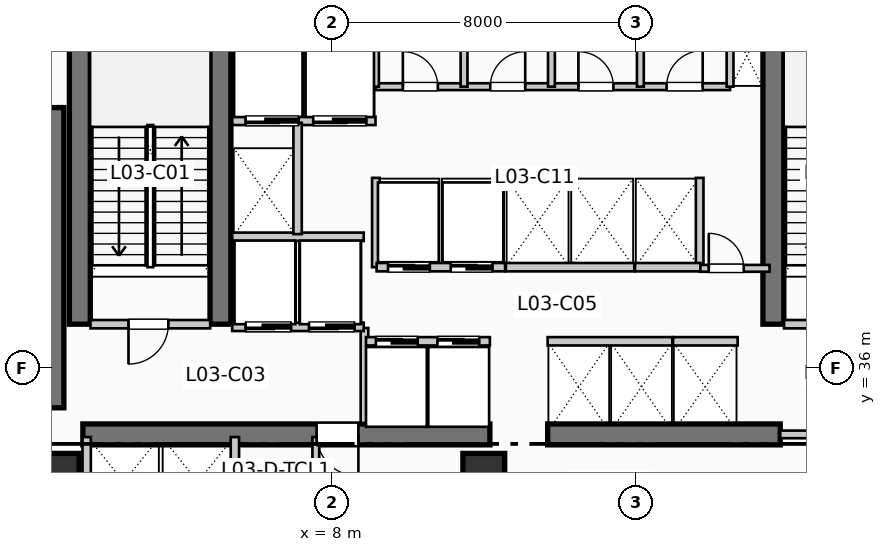
"""IFC4 building model, lengths in metres.
Left out: names, types, materials, properties, quantities, classifications, styles, units other than length and angle.
Written with IfcOpenShell. Run it as: python <this file> out.ifc"""

import sys

from ifc_helpers import new_model, si_unit, direction, frame, frame_2d, origin, origin_2d, place, context, subcontext, project, spatial, rectangle, extrude, element, fill, save


model = new_model("IFC4")
c1 = context("Model", 3, precision=1e-05, world=origin(), true_north=direction((0.0, 1.0)))
c2 = subcontext(c1, "Body", "Model", "MODEL_VIEW")
j1 = project(units=[si_unit("LENGTHUNIT", "METRE"), si_unit("PLANEANGLEUNIT", "RADIAN")], contexts=[c1])
p1 = place(None, origin())
s1 = spatial("IfcSite", under=j1, at=p1, CompositionType="ELEMENT")
p2 = place(p1, origin())
s2 = spatial("IfcBuilding", under=s1, at=p2, CompositionType="ELEMENT")
p3 = place(p2, frame((0.0, 0.0, 16.5)))
s3 = spatial("IfcBuildingStorey", under=s2, at=p3, CompositionType="ELEMENT", Elevation=16.5)
p4 = place(p3, frame((0.5, 34.95, 0.0), z_axis=(0.0, 0.0, 1.0), x_axis=(0.0, 1.0, 0.0)))
e1 = element("IfcWall", 1, at=p4, inside=s3, PredefinedType="SHEAR", context=c2, shape_type="SweptSolid", body=[
    extrude(rectangle(XDim=7.9, YDim=0.9, at=frame_2d((3.95, 0.0))), origin(), (0.0, 0.0, 1.0), 4.62),
])
p5 = place(p3, frame((1.45, 34.25, 0.0), z_axis=(0.0, 0.0, 1.0), x_axis=(1.0, 0.0, 0.0)))
e2 = element("IfcWall", 2, at=p5, inside=s3, PredefinedType="SHEAR", context=c2, shape_type="SweptSolid", body=[
    extrude(rectangle(XDim=10.71, YDim=0.55, at=frame_2d((5.355, 0.0))), origin(), (0.0, 0.0, 1.0), 4.62),
])
p6 = place(p5, frame((7.25, 0.0, 0.0), z_axis=(0.0, 0.0, 1.0), x_axis=(-1.0, 0.0, 0.0)))
e3 = element("IfcOpeningElement", 3, at=p6, cuts=e2, PredefinedType="OPENING", context=c2, shape_type="SweptSolid", body=[
    extrude(rectangle(XDim=1.1, YDim=2.15, at=frame_2d((0.55, 1.075))), frame((0.0, 0.285, 0.0), z_axis=(0.0, -1.0, 0.0), x_axis=(1.0, 0.0, 0.0)), (0.0, 0.0, 1.0), 0.57),
])
p7 = place(p3, frame((13.68, 34.25, 0.0), z_axis=(0.0, 0.0, 1.0), x_axis=(1.0, 0.0, 0.0)))
e4 = element("IfcWall", 4, at=p7, inside=s3, PredefinedType="SHEAR", context=c2, shape_type="SweptSolid", body=[
    extrude(rectangle(XDim=6.12, YDim=0.55, at=frame_2d((3.06, 0.0))), origin(), (0.0, 0.0, 1.0), 4.62),
])
for number, where, z_axis, x_axis in (
    (5, (1.37, 37.15, 0.0), (0.0, 0.0, 1.0), (0.0, 1.0, 0.0)),
    (6, (5.07, 37.15, 0.0), (0.0, 0.0, 1.0), (0.0, 1.0, 0.0)),
    (7, (19.62, 37.15, 0.0), (0.0, 0.0, 1.0), (0.0, 1.0, 0.0)),
):
    element("IfcWall", number, at=place(p3, frame(where, z_axis=z_axis, x_axis=x_axis)), inside=s3, PredefinedType="SHEAR", context=c2, shape_type="SweptSolid", body=[
        extrude(rectangle(XDim=7.89, YDim=0.55, at=frame_2d((3.945, 0.0))), origin(), (0.0, 0.0, 1.0), 4.62),
    ])
for number, where, z_axis, x_axis in (
    (8, (0.8, 33.2, 0.0), (0.0, 0.0, 1.0), (1.0, 0.0, 0.0)),
    (9, (12.0, 33.2, 0.0), (0.0, 0.0, 1.0), (1.0, 0.0, 0.0)),
):
    element("IfcColumn", number, at=place(p3, frame(where, z_axis=z_axis, x_axis=x_axis)), inside=s3, PredefinedType="COLUMN", context=c2, shape_type="SweptSolid", body=[
        extrude(rectangle(XDim=1.1, YDim=1.1, at=origin_2d()), origin(), (0.0, 0.0, 1.0), 4.62),
    ])
p8 = place(p3, frame((1.65, 37.15, 0.0), z_axis=(0.0, 0.0, 1.0), x_axis=(1.0, 0.0, 0.0)))
e10 = element("IfcWall", 10, at=p8, inside=s3, PredefinedType="PARTITIONING", context=c2, shape_type="SweptSolid", body=[
    extrude(rectangle(XDim=3.15, YDim=0.22, at=frame_2d((1.575, 0.0))), origin(), (0.0, 0.0, 1.0), 4.3),
])
p9 = place(p8, frame((2.05, 0.0, 0.0), z_axis=(0.0, 0.0, 1.0), x_axis=(-1.0, 0.0, 0.0)))
e11 = element("IfcOpeningElement", 11, at=p9, cuts=e10, PredefinedType="OPENING", context=c2, shape_type="SweptSolid", body=[
    extrude(rectangle(XDim=1.05, YDim=2.15, at=frame_2d((0.525, 1.075))), frame((0.0, 0.12, 0.0), z_axis=(0.0, -1.0, 0.0), x_axis=(1.0, 0.0, 0.0)), (0.0, 0.0, 1.0), 0.24),
])
p10 = place(p3, frame((8.86, 34.55, 0.0), z_axis=(0.0, 0.0, 1.0), x_axis=(0.0, 1.0, 0.0)))
e12 = element("IfcWall", 12, at=p10, inside=s3, PredefinedType="PARTITIONING", context=c2, shape_type="SweptSolid", body=[
    extrude(rectangle(XDim=2.5, YDim=0.2, at=frame_2d((1.25, 0.0))), origin(), (0.0, 0.0, 1.0), 4.3),
])
p11 = place(p3, frame((19.9, 37.15, 0.0), z_axis=(0.0, 0.0, 1.0), x_axis=(1.0, 0.0, 0.0)))
e13 = element("IfcWall", 13, at=p11, inside=s3, PredefinedType="PARTITIONING", context=c2, shape_type="SweptSolid", body=[
    extrude(rectangle(XDim=3.15, YDim=0.22, at=frame_2d((1.575, 0.0))), origin(), (0.0, 0.0, 1.0), 4.3),
])
p12 = place(p11, frame((2.05, 0.0, 0.0), z_axis=(0.0, 0.0, 1.0), x_axis=(-1.0, 0.0, 0.0)))
e14 = element("IfcOpeningElement", 14, at=p12, cuts=e13, PredefinedType="OPENING", context=c2, shape_type="SweptSolid", body=[
    extrude(rectangle(XDim=1.05, YDim=2.15, at=frame_2d((0.525, 1.075))), frame((0.0, 0.12, 0.0), z_axis=(0.0, -1.0, 0.0), x_axis=(1.0, 0.0, 0.0)), (0.0, 0.0, 1.0), 0.24),
])
p13 = place(p3, frame((19.8, 34.25, 0.0), z_axis=(0.0, 0.0, 1.0), x_axis=(1.0, 0.0, 0.0)))
e15 = element("IfcWall", 15, at=p13, inside=s3, PredefinedType="PARTITIONING", context=c2, shape_type="SweptSolid", body=[
    extrude(rectangle(XDim=3.25, YDim=0.2, at=frame_2d((1.625, 0.0))), origin(), (0.0, 0.0, 1.0), 4.3),
])
p14 = place(p13, frame((2.15, 0.0, 0.0), z_axis=(0.0, 0.0, 1.0), x_axis=(-1.0, 0.0, 0.0)))
e16 = element("IfcOpeningElement", 16, at=p14, cuts=e15, PredefinedType="OPENING", context=c2, shape_type="SweptSolid", body=[
    extrude(rectangle(XDim=1.1, YDim=2.15, at=frame_2d((0.55, 1.075))), frame((0.0, 0.11, 0.0), z_axis=(0.0, -1.0, 0.0), x_axis=(1.0, 0.0, 0.0)), (0.0, 0.0, 1.0), 0.22),
])
p15 = place(p3, frame((5.38, 37.08, 0.0), z_axis=(0.0, 0.0, 1.0), x_axis=(1.0, 0.0, 0.0)))
e17 = element("IfcWall", 17, at=p15, inside=s3, PredefinedType="PARTITIONING", context=c2, shape_type="SweptSolid", body=[
    extrude(rectangle(XDim=3.46, YDim=0.22, at=frame_2d((1.73, 0.0))), origin(), (0.0, 0.0, 1.0), 4.3),
])
p16 = place(p15, frame((1.55, 0.0, 0.0), z_axis=(0.0, 0.0, 1.0), x_axis=(-1.0, 0.0, 0.0)))
e18 = element("IfcOpeningElement", 18, at=p16, cuts=e17, PredefinedType="OPENING", context=c2, shape_type="SweptSolid", body=[
    extrude(rectangle(XDim=1.2, YDim=2.2, at=frame_2d((0.6, 1.1))), frame((0.0, 0.12, 0.0), z_axis=(0.0, -1.0, 0.0), x_axis=(1.0, 0.0, 0.0)), (0.0, 0.0, 1.0), 0.24),
])
p17 = place(p15, frame((3.22, 0.0, 0.0), z_axis=(0.0, 0.0, 1.0), x_axis=(-1.0, 0.0, 0.0)))
e19 = element("IfcOpeningElement", 19, at=p17, cuts=e17, PredefinedType="OPENING", context=c2, shape_type="SweptSolid", body=[
    extrude(rectangle(XDim=1.2, YDim=2.2, at=frame_2d((0.6, 1.1))), frame((0.0, 0.12, 0.0), z_axis=(0.0, -1.0, 0.0), x_axis=(1.0, 0.0, 0.0)), (0.0, 0.0, 1.0), 0.24),
])
p18 = place(p3, frame((5.38, 39.45, 0.0), z_axis=(0.0, 0.0, 1.0), x_axis=(1.0, 0.0, 0.0)))
e20 = element("IfcWall", 20, at=p18, inside=s3, PredefinedType="PARTITIONING", context=c2, shape_type="SweptSolid", body=[
    extrude(rectangle(XDim=3.46, YDim=0.22, at=frame_2d((1.73, 0.0))), origin(), (0.0, 0.0, 1.0), 4.3),
])
p19 = place(p3, frame((5.38, 42.5, 0.0), z_axis=(0.0, 0.0, 1.0), x_axis=(1.0, 0.0, 0.0)))
e21 = element("IfcWall", 21, at=p19, inside=s3, PredefinedType="PARTITIONING", context=c2, shape_type="SweptSolid", body=[
    extrude(rectangle(XDim=3.77, YDim=0.22, at=frame_2d((1.885, 0.0))), origin(), (0.0, 0.0, 1.0), 4.3),
])
p20 = place(p19, frame((1.75, 0.0, 0.0), z_axis=(0.0, 0.0, 1.0), x_axis=(-1.0, 0.0, 0.0)))
e22 = element("IfcOpeningElement", 22, at=p20, cuts=e21, PredefinedType="OPENING", context=c2, shape_type="SweptSolid", body=[
    extrude(rectangle(XDim=1.4, YDim=2.2, at=frame_2d((0.7, 1.1))), frame((0.0, 0.12, 0.0), z_axis=(0.0, -1.0, 0.0), x_axis=(1.0, 0.0, 0.0)), (0.0, 0.0, 1.0), 0.24),
])
p21 = place(p19, frame((3.53, 0.0, 0.0), z_axis=(0.0, 0.0, 1.0), x_axis=(-1.0, 0.0, 0.0)))
e23 = element("IfcOpeningElement", 23, at=p21, cuts=e21, PredefinedType="OPENING", context=c2, shape_type="SweptSolid", body=[
    extrude(rectangle(XDim=1.4, YDim=2.2, at=frame_2d((0.7, 1.1))), frame((0.0, 0.12, 0.0), z_axis=(0.0, -1.0, 0.0), x_axis=(1.0, 0.0, 0.0)), (0.0, 0.0, 1.0), 0.24),
])
p22 = place(p3, frame((7.1, 39.52, 0.0), z_axis=(0.0, 0.0, 1.0), x_axis=(0.0, 1.0, 0.0)))
e24 = element("IfcWall", 24, at=p22, inside=s3, PredefinedType="PARTITIONING", context=c2, shape_type="SweptSolid", body=[
    extrude(rectangle(XDim=2.93, YDim=0.22, at=frame_2d((1.465, 0.0))), origin(), (0.0, 0.0, 1.0), 4.3),
])
for number, where, z_axis, x_axis in (
    (25, (1.55, 31.8, 0.0), (0.0, 0.0, 1.0), (0.0, 1.0, 0.0)),
    (26, (5.45, 31.8, 0.0), (0.0, 0.0, 1.0), (0.0, 1.0, 0.0)),
):
    element("IfcWall", number, at=place(p3, frame(where, z_axis=z_axis, x_axis=x_axis)), inside=s3, PredefinedType="PARTITIONING", context=c2, shape_type="SweptSolid", body=[
        extrude(rectangle(XDim=2.38, YDim=0.22, at=frame_2d((1.19, 0.0))), origin(), (0.0, 0.0, 1.0), 4.3),
    ])
for number, where, z_axis, x_axis in (
    (27, (9.16, 38.65, 0.0), (0.0, 0.0, 1.0), (0.0, 1.0, 0.0)),
    (28, (17.68, 38.65, 0.0), (0.0, 0.0, 1.0), (0.0, 1.0, 0.0)),
):
    element("IfcWall", number, at=place(p3, frame(where, z_axis=z_axis, x_axis=x_axis)), inside=s3, PredefinedType="PARTITIONING", context=c2, shape_type="SweptSolid", body=[
        extrude(rectangle(XDim=2.35, YDim=0.2, at=frame_2d((1.175, 0.0))), origin(), (0.0, 0.0, 1.0), 4.3),
    ])
p23 = place(p3, frame((17.68, 38.62, 0.0), z_axis=(0.0, 0.0, 1.0), x_axis=(1.0, 0.0, 0.0)))
e29 = element("IfcWall", 29, at=p23, inside=s3, PredefinedType="PARTITIONING", context=c2, shape_type="SweptSolid", body=[
    extrude(rectangle(XDim=1.84, YDim=0.18, at=frame_2d((0.92, 0.0))), origin(), (0.0, 0.0, 1.0), 4.3),
])
p24 = place(p23, frame((0.24, 0.0, 0.0)))
e30 = element("IfcOpeningElement", 30, at=p24, cuts=e29, PredefinedType="OPENING", context=c2, shape_type="SweptSolid", body=[
    extrude(rectangle(XDim=0.92, YDim=2.1, at=frame_2d((0.46, 1.05))), frame((0.0, 0.1, 0.0), z_axis=(0.0, -1.0, 0.0), x_axis=(1.0, 0.0, 0.0)), (0.0, 0.0, 1.0), 0.2),
])
p25 = place(p3, frame((7.58, 31.82, 0.0), z_axis=(0.0, 0.0, 1.0), x_axis=(0.0, 1.0, 0.0)))
e31 = element("IfcWall", 31, at=p25, inside=s3, PredefinedType="PLUMBINGWALL", context=c2, shape_type="SweptSolid", body=[
    extrude(rectangle(XDim=2.36, YDim=0.18, at=frame_2d((1.18, 0.0))), origin(), (0.0, 0.0, 1.0), 4.3),
])
p26 = place(p3, frame((8.9, 36.7, 0.0), z_axis=(0.0, 0.0, 1.0), x_axis=(1.0, 0.0, 0.0)))
e32 = element("IfcWall", 32, at=p26, inside=s3, PredefinedType="PARTITIONING", context=c2, shape_type="SweptSolid", body=[
    extrude(rectangle(XDim=3.26, YDim=0.22, at=frame_2d((1.63, 0.0))), origin(), (0.0, 0.0, 1.0), 4.3),
])
p27 = place(p26, frame((0.26, 0.0, 0.0)))
e33 = element("IfcOpeningElement", 33, at=p27, cuts=e32, PredefinedType="OPENING", context=c2, shape_type="SweptSolid", body=[
    extrude(rectangle(XDim=1.1, YDim=2.2, at=frame_2d((0.55, 1.1))), frame((0.0, 0.12, 0.0), z_axis=(0.0, -1.0, 0.0), x_axis=(1.0, 0.0, 0.0)), (0.0, 0.0, 1.0), 0.24),
])
p28 = place(p26, frame((1.88, 0.0, 0.0)))
e34 = element("IfcOpeningElement", 34, at=p28, cuts=e32, PredefinedType="OPENING", context=c2, shape_type="SweptSolid", body=[
    extrude(rectangle(XDim=1.1, YDim=2.2, at=frame_2d((0.55, 1.1))), frame((0.0, 0.12, 0.0), z_axis=(0.0, -1.0, 0.0), x_axis=(1.0, 0.0, 0.0)), (0.0, 0.0, 1.0), 0.24),
])
p29 = place(p3, frame((9.18, 38.65, 0.0), z_axis=(0.0, 0.0, 1.0), x_axis=(1.0, 0.0, 0.0)))
e35 = element("IfcWall", 35, at=p29, inside=s3, PredefinedType="PARTITIONING", context=c2, shape_type="SweptSolid", body=[
    extrude(rectangle(XDim=3.38, YDim=0.22, at=frame_2d((1.69, 0.0))), origin(), (0.0, 0.0, 1.0), 4.3),
])
p30 = place(p29, frame((0.3, 0.0, 0.0)))
e36 = element("IfcOpeningElement", 36, at=p30, cuts=e35, PredefinedType="OPENING", context=c2, shape_type="SweptSolid", body=[
    extrude(rectangle(XDim=1.1, YDim=2.2, at=frame_2d((0.55, 1.1))), frame((0.0, 0.12, 0.0), z_axis=(0.0, -1.0, 0.0), x_axis=(1.0, 0.0, 0.0)), (0.0, 0.0, 1.0), 0.24),
])
p31 = place(p29, frame((1.95, 0.0, 0.0)))
e37 = element("IfcOpeningElement", 37, at=p31, cuts=e35, PredefinedType="OPENING", context=c2, shape_type="SweptSolid", body=[
    extrude(rectangle(XDim=1.1, YDim=2.2, at=frame_2d((0.55, 1.1))), frame((0.0, 0.12, 0.0), z_axis=(0.0, -1.0, 0.0), x_axis=(1.0, 0.0, 0.0)), (0.0, 0.0, 1.0), 0.24),
])
p32 = place(p3, frame((13.68, 36.7, 0.0), z_axis=(0.0, 0.0, 1.0), x_axis=(1.0, 0.0, 0.0)))
e38 = element("IfcWall", 38, at=p32, inside=s3, PredefinedType="PARTITIONING", context=c2, shape_type="SweptSolid", body=[
    extrude(rectangle(XDim=3.28, YDim=0.22, at=frame_2d((1.64, 0.0))), origin(), (0.0, 0.0, 1.0), 4.3),
])
p33 = place(p3, frame((12.58, 38.65, 0.0), z_axis=(0.0, 0.0, 1.0), x_axis=(1.0, 0.0, 0.0)))
e39 = element("IfcWall", 39, at=p33, inside=s3, PredefinedType="PARTITIONING", context=c2, shape_type="SweptSolid", body=[
    extrude(rectangle(XDim=3.38, YDim=0.22, at=frame_2d((1.69, 0.0))), origin(), (0.0, 0.0, 1.0), 4.3),
])
p34 = place(p3, frame((16.98, 36.7, 0.0), z_axis=(0.0, 0.0, 1.0), x_axis=(1.0, 0.0, 0.0)))
e40 = element("IfcWall", 40, at=p34, inside=s3, PredefinedType="PARTITIONING", context=c2, shape_type="SweptSolid", body=[
    extrude(rectangle(XDim=1.7, YDim=0.22, at=frame_2d((0.85, 0.0))), origin(), (0.0, 0.0, 1.0), 4.3),
])
p35 = place(p3, frame((15.98, 38.65, 0.0), z_axis=(0.0, 0.0, 1.0), x_axis=(1.0, 0.0, 0.0)))
e41 = element("IfcWall", 41, at=p35, inside=s3, PredefinedType="PARTITIONING", context=c2, shape_type="SweptSolid", body=[
    extrude(rectangle(XDim=1.72, YDim=0.22, at=frame_2d((0.86, 0.0))), origin(), (0.0, 0.0, 1.0), 4.3),
])
p36 = place(p3, frame((9.15, 43.4, 0.0), z_axis=(0.0, 0.0, 1.0), x_axis=(1.0, 0.0, 0.0)))
e42 = element("IfcWall", 42, at=p36, inside=s3, PredefinedType="PLUMBINGWALL", context=c2, shape_type="SweptSolid", body=[
    extrude(rectangle(XDim=9.33, YDim=0.18, at=frame_2d((4.665, 0.0))), origin(), (0.0, 0.0, 1.0), 4.3),
])
p37 = place(p36, frame((0.72, 0.0, 0.0)))
e43 = element("IfcOpeningElement", 43, at=p37, cuts=e42, PredefinedType="OPENING", context=c2, shape_type="SweptSolid", body=[
    extrude(rectangle(XDim=0.92, YDim=2.1, at=frame_2d((0.46, 1.05))), frame((0.0, 0.1, 0.0), z_axis=(0.0, -1.0, 0.0), x_axis=(1.0, 0.0, 0.0)), (0.0, 0.0, 1.0), 0.2),
])
p38 = place(p36, frame((3.02, 0.0, 0.0)))
e44 = element("IfcOpeningElement", 44, at=p38, cuts=e42, PredefinedType="OPENING", context=c2, shape_type="SweptSolid", body=[
    extrude(rectangle(XDim=0.92, YDim=2.1, at=frame_2d((0.46, 1.05))), frame((0.0, 0.1, 0.0), z_axis=(0.0, -1.0, 0.0), x_axis=(1.0, 0.0, 0.0)), (0.0, 0.0, 1.0), 0.2),
])
p39 = place(p36, frame((5.34, 0.0, 0.0)))
e45 = element("IfcOpeningElement", 45, at=p39, cuts=e42, PredefinedType="OPENING", context=c2, shape_type="SweptSolid", body=[
    extrude(rectangle(XDim=0.92, YDim=2.1, at=frame_2d((0.46, 1.05))), frame((0.0, 0.1, 0.0), z_axis=(0.0, -1.0, 0.0), x_axis=(1.0, 0.0, 0.0)), (0.0, 0.0, 1.0), 0.2),
])
p40 = place(p36, frame((7.66, 0.0, 0.0)))
e46 = element("IfcOpeningElement", 46, at=p40, cuts=e42, PredefinedType="OPENING", context=c2, shape_type="SweptSolid", body=[
    extrude(rectangle(XDim=0.95, YDim=2.1, at=frame_2d((0.475, 1.05))), frame((0.0, 0.1, 0.0), z_axis=(0.0, -1.0, 0.0), x_axis=(1.0, 0.0, 0.0)), (0.0, 0.0, 1.0), 0.2),
])
for number, where, z_axis, x_axis in (
    (47, (9.15, 43.4, 0.0), (0.0, 0.0, 1.0), (0.0, 1.0, 0.0)),
    (48, (18.48, 43.4, 0.0), (0.0, 0.0, 1.0), (0.0, 1.0, 0.0)),
    (49, (11.48, 43.4, 0.0), (0.0, 0.0, 1.0), (0.0, 1.0, 0.0)),
    (50, (13.78, 43.4, 0.0), (0.0, 0.0, 1.0), (0.0, 1.0, 0.0)),
    (51, (16.12, 43.4, 0.0), (0.0, 0.0, 1.0), (0.0, 1.0, 0.0)),
):
    element("IfcWall", number, at=place(p3, frame(where, z_axis=z_axis, x_axis=x_axis)), inside=s3, PredefinedType="PLUMBINGWALL", context=c2, shape_type="SweptSolid", body=[
        extrude(rectangle(XDim=1.88, YDim=0.18, at=frame_2d((0.94, 0.0))), origin(), (0.0, 0.0, 1.0), 4.3),
    ])
p41 = place(p9, origin())
e52 = element("IfcDoor", 52, at=p41, inside=s3, OperationType="SINGLE_SWING_LEFT", PredefinedType="DOOR", context=c2, shape_type="SweptSolid", body=[
    extrude(rectangle(XDim=1.05, YDim=2.15, at=frame_2d((0.525, 1.075))), frame((0.0, 0.025, 0.0), z_axis=(0.0, -1.0, 0.0), x_axis=(1.0, 0.0, 0.0)), (0.0, 0.0, 1.0), 0.05),
])
fill(e11, e52)
p42 = place(p6, origin())
e53 = element("IfcDoor", 53, at=p42, inside=s3, OperationType="SINGLE_SWING_RIGHT", PredefinedType="DOOR", context=c2, shape_type="SweptSolid", body=[
    extrude(rectangle(XDim=1.1, YDim=2.15, at=frame_2d((0.55, 1.075))), frame((0.0, 0.025, 0.0), z_axis=(0.0, -1.0, 0.0), x_axis=(1.0, 0.0, 0.0)), (0.0, 0.0, 1.0), 0.05),
])
fill(e3, e53)
p43 = place(p16, origin())
e54 = element("IfcDoor", 54, at=p43, inside=s3, OperationType="SLIDING_TO_RIGHT", PredefinedType="DOOR", context=c2, shape_type="SweptSolid", body=[
    extrude(rectangle(XDim=1.2, YDim=2.2, at=frame_2d((0.6, 1.1))), frame((0.0, 0.025, 0.0), z_axis=(0.0, -1.0, 0.0), x_axis=(1.0, 0.0, 0.0)), (0.0, 0.0, 1.0), 0.05),
])
fill(e18, e54)
p44 = place(p17, origin())
e55 = element("IfcDoor", 55, at=p44, inside=s3, OperationType="SLIDING_TO_RIGHT", PredefinedType="DOOR", context=c2, shape_type="SweptSolid", body=[
    extrude(rectangle(XDim=1.2, YDim=2.2, at=frame_2d((0.6, 1.1))), frame((0.0, 0.025, 0.0), z_axis=(0.0, -1.0, 0.0), x_axis=(1.0, 0.0, 0.0)), (0.0, 0.0, 1.0), 0.05),
])
fill(e19, e55)
p45 = place(p20, origin())
e56 = element("IfcDoor", 56, at=p45, inside=s3, OperationType="SLIDING_TO_LEFT", PredefinedType="DOOR", context=c2, shape_type="SweptSolid", body=[
    extrude(rectangle(XDim=1.4, YDim=2.2, at=frame_2d((0.7, 1.1))), frame((0.0, 0.025, 0.0), z_axis=(0.0, -1.0, 0.0), x_axis=(1.0, 0.0, 0.0)), (0.0, 0.0, 1.0), 0.05),
])
fill(e22, e56)
p46 = place(p21, origin())
e57 = element("IfcDoor", 57, at=p46, inside=s3, OperationType="SLIDING_TO_LEFT", PredefinedType="DOOR", context=c2, shape_type="SweptSolid", body=[
    extrude(rectangle(XDim=1.4, YDim=2.2, at=frame_2d((0.7, 1.1))), frame((0.0, 0.025, 0.0), z_axis=(0.0, -1.0, 0.0), x_axis=(1.0, 0.0, 0.0)), (0.0, 0.0, 1.0), 0.05),
])
fill(e23, e57)
p47 = place(p24, origin())
e58 = element("IfcDoor", 58, at=p47, inside=s3, OperationType="SINGLE_SWING_LEFT", PredefinedType="DOOR", context=c2, shape_type="SweptSolid", body=[
    extrude(rectangle(XDim=0.92, YDim=2.1, at=frame_2d((0.46, 1.05))), frame((0.0, 0.025, 0.0), z_axis=(0.0, -1.0, 0.0), x_axis=(1.0, 0.0, 0.0)), (0.0, 0.0, 1.0), 0.05),
])
fill(e30, e58)
p48 = place(p27, origin())
e59 = element("IfcDoor", 59, at=p48, inside=s3, OperationType="SLIDING_TO_LEFT", PredefinedType="DOOR", context=c2, shape_type="SweptSolid", body=[
    extrude(rectangle(XDim=1.1, YDim=2.2, at=frame_2d((0.55, 1.1))), frame((0.0, 0.025, 0.0), z_axis=(0.0, -1.0, 0.0), x_axis=(1.0, 0.0, 0.0)), (0.0, 0.0, 1.0), 0.05),
])
fill(e33, e59)
p49 = place(p28, origin())
e60 = element("IfcDoor", 60, at=p49, inside=s3, OperationType="SLIDING_TO_LEFT", PredefinedType="DOOR", context=c2, shape_type="SweptSolid", body=[
    extrude(rectangle(XDim=1.1, YDim=2.2, at=frame_2d((0.55, 1.1))), frame((0.0, 0.025, 0.0), z_axis=(0.0, -1.0, 0.0), x_axis=(1.0, 0.0, 0.0)), (0.0, 0.0, 1.0), 0.05),
])
fill(e34, e60)
p50 = place(p30, origin())
e61 = element("IfcDoor", 61, at=p50, inside=s3, OperationType="SLIDING_TO_LEFT", PredefinedType="DOOR", context=c2, shape_type="SweptSolid", body=[
    extrude(rectangle(XDim=1.1, YDim=2.2, at=frame_2d((0.55, 1.1))), frame((0.0, 0.025, 0.0), z_axis=(0.0, -1.0, 0.0), x_axis=(1.0, 0.0, 0.0)), (0.0, 0.0, 1.0), 0.05),
])
fill(e36, e61)
p51 = place(p31, origin())
e62 = element("IfcDoor", 62, at=p51, inside=s3, OperationType="SLIDING_TO_LEFT", PredefinedType="DOOR", context=c2, shape_type="SweptSolid", body=[
    extrude(rectangle(XDim=1.1, YDim=2.2, at=frame_2d((0.55, 1.1))), frame((0.0, 0.025, 0.0), z_axis=(0.0, -1.0, 0.0), x_axis=(1.0, 0.0, 0.0)), (0.0, 0.0, 1.0), 0.05),
])
fill(e37, e62)
p52 = place(p37, origin())
e63 = element("IfcDoor", 63, at=p52, inside=s3, OperationType="SINGLE_SWING_LEFT", PredefinedType="DOOR", context=c2, shape_type="SweptSolid", body=[
    extrude(rectangle(XDim=0.92, YDim=2.1, at=frame_2d((0.46, 1.05))), frame((0.0, 0.025, 0.0), z_axis=(0.0, -1.0, 0.0), x_axis=(1.0, 0.0, 0.0)), (0.0, 0.0, 1.0), 0.05),
])
fill(e43, e63)
p53 = place(p38, origin())
e64 = element("IfcDoor", 64, at=p53, inside=s3, OperationType="SINGLE_SWING_RIGHT", PredefinedType="DOOR", context=c2, shape_type="SweptSolid", body=[
    extrude(rectangle(XDim=0.92, YDim=2.1, at=frame_2d((0.46, 1.05))), frame((0.0, 0.025, 0.0), z_axis=(0.0, -1.0, 0.0), x_axis=(1.0, 0.0, 0.0)), (0.0, 0.0, 1.0), 0.05),
])
fill(e44, e64)
p54 = place(p39, origin())
e65 = element("IfcDoor", 65, at=p54, inside=s3, OperationType="SINGLE_SWING_LEFT", PredefinedType="DOOR", context=c2, shape_type="SweptSolid", body=[
    extrude(rectangle(XDim=0.92, YDim=2.1, at=frame_2d((0.46, 1.05))), frame((0.0, 0.025, 0.0), z_axis=(0.0, -1.0, 0.0), x_axis=(1.0, 0.0, 0.0)), (0.0, 0.0, 1.0), 0.05),
])
fill(e45, e65)
p55 = place(p40, origin())
e66 = element("IfcDoor", 66, at=p55, inside=s3, OperationType="SINGLE_SWING_RIGHT", PredefinedType="DOOR", context=c2, shape_type="SweptSolid", body=[
    extrude(rectangle(XDim=0.95, YDim=2.1, at=frame_2d((0.475, 1.05))), frame((0.0, 0.025, 0.0), z_axis=(0.0, -1.0, 0.0), x_axis=(1.0, 0.0, 0.0)), (0.0, 0.0, 1.0), 0.05),
])
fill(e46, e66)
save(model, sys.argv[1])
